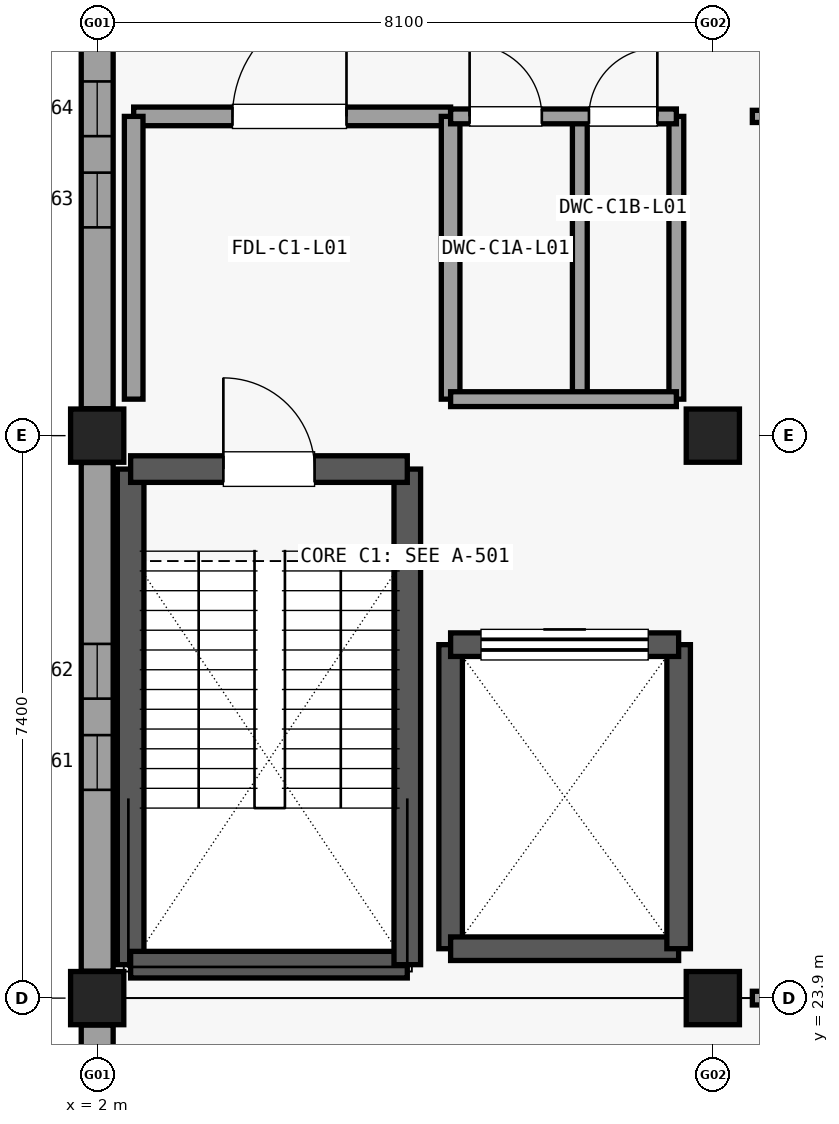
"""IFC4 building model, lengths in metres.
Left out: names, types, materials, properties, quantities, classifications, styles, units other than length and angle.
Written with IfcOpenShell. Run it as: python <this file> out.ifc"""

import sys

from ifc_helpers import new_model, si_unit, direction, frame, frame_2d, origin, origin_2d, place, context, subcontext, project, spatial, rectangle, extrude, element, fill, save


model = new_model("IFC4")
c1 = context("Model", 3, precision=1e-05, world=origin(), true_north=direction((0.0, 1.0)))
c2 = subcontext(c1, "Body", "Model", "MODEL_VIEW")
j1 = project(units=[si_unit("LENGTHUNIT", "METRE"), si_unit("PLANEANGLEUNIT", "RADIAN")], contexts=[c1])
p1 = place(None, origin())
s1 = spatial("IfcSite", under=j1, at=p1, CompositionType="ELEMENT")
p2 = place(p1, origin())
s2 = spatial("IfcBuilding", under=s1, at=p2, CompositionType="ELEMENT")
p3 = place(p2, frame((0.0, 0.0, 5.4)))
s3 = spatial("IfcBuildingStorey", under=s2, at=p3, CompositionType="ELEMENT", Elevation=5.4)
for number, where, z_axis, x_axis in (
    (1, (2.0, 23.9, 0.0), (0.0, 0.0, 1.0), (1.0, 0.0, 0.0)),
    (2, (2.0, 31.3, 0.0), (0.0, 0.0, 1.0), (1.0, 0.0, 0.0)),
    (3, (10.1, 23.9, 0.0), (0.0, 0.0, 1.0), (1.0, 0.0, 0.0)),
    (4, (10.1, 31.3, 0.0), (0.0, 0.0, 1.0), (1.0, 0.0, 0.0)),
):
    element("IfcColumn", number, at=place(p3, frame(where, z_axis=z_axis, x_axis=x_axis)), inside=s3, PredefinedType="COLUMN", context=c2, shape_type="SweptSolid", body=[
        extrude(rectangle(XDim=0.7, YDim=0.7, at=origin_2d()), origin(), (0.0, 0.0, 1.0), 4.56),
    ])
p4 = place(p3, frame((2.0, 16.854, 0.0), z_axis=(0.0, 0.0, 1.0), x_axis=(0.0, 1.0, 0.0)))
e5 = element("IfcWall", 5, at=p4, inside=s3, PredefinedType="SOLIDWALL", context=c2, shape_type="SweptSolid", body=[
    extrude(rectangle(XDim=6.692, YDim=0.42, at=frame_2d((3.346, 0.0))), origin(), (0.0, 0.0, 1.0), 3.795),
])
p5 = place(p4, frame((2.386, 0.0, 0.65)))
e6 = element("IfcOpeningElement", 6, at=p5, cuts=e5, PredefinedType="OPENING", context=c2, shape_type="SweptSolid", body=[
    extrude(rectangle(XDim=0.72, YDim=2.65, at=frame_2d((0.36, 1.325))), frame((0.0, 0.22, 0.0), z_axis=(0.0, -1.0, 0.0), x_axis=(1.0, 0.0, 0.0)), (0.0, 0.0, 1.0), 0.44),
])
p6 = place(p4, frame((3.586, 0.0, 0.65)))
e7 = element("IfcOpeningElement", 7, at=p6, cuts=e5, PredefinedType="OPENING", context=c2, shape_type="SweptSolid", body=[
    extrude(rectangle(XDim=0.72, YDim=2.65, at=frame_2d((0.36, 1.325))), frame((0.0, 0.22, 0.0), z_axis=(0.0, -1.0, 0.0), x_axis=(1.0, 0.0, 0.0)), (0.0, 0.0, 1.0), 0.44),
])
p7 = place(p3, frame((2.0, 24.254, 0.0), z_axis=(0.0, 0.0, 1.0), x_axis=(0.0, 1.0, 0.0)))
e8 = element("IfcWall", 8, at=p7, inside=s3, PredefinedType="SOLIDWALL", context=c2, shape_type="SweptSolid", body=[
    extrude(rectangle(XDim=6.692, YDim=0.42, at=frame_2d((3.346, 0.0))), origin(), (0.0, 0.0, 1.0), 3.795),
])
p8 = place(p7, frame((2.386, 0.0, 0.65)))
e9 = element("IfcOpeningElement", 9, at=p8, cuts=e8, PredefinedType="OPENING", context=c2, shape_type="SweptSolid", body=[
    extrude(rectangle(XDim=0.72, YDim=2.65, at=frame_2d((0.36, 1.325))), frame((0.0, 0.22, 0.0), z_axis=(0.0, -1.0, 0.0), x_axis=(1.0, 0.0, 0.0)), (0.0, 0.0, 1.0), 0.44),
])
p9 = place(p7, frame((3.586, 0.0, 0.65)))
e10 = element("IfcOpeningElement", 10, at=p9, cuts=e8, PredefinedType="OPENING", context=c2, shape_type="SweptSolid", body=[
    extrude(rectangle(XDim=0.72, YDim=2.65, at=frame_2d((0.36, 1.325))), frame((0.0, 0.22, 0.0), z_axis=(0.0, -1.0, 0.0), x_axis=(1.0, 0.0, 0.0)), (0.0, 0.0, 1.0), 0.44),
])
p10 = place(p3, frame((2.0, 31.654, 0.0), z_axis=(0.0, 0.0, 1.0), x_axis=(0.0, 1.0, 0.0)))
e11 = element("IfcWall", 11, at=p10, inside=s3, PredefinedType="SOLIDWALL", context=c2, shape_type="SweptSolid", body=[
    extrude(rectangle(XDim=6.692, YDim=0.42, at=frame_2d((3.346, 0.0))), origin(), (0.0, 0.0, 1.0), 3.795),
])
p11 = place(p10, frame((2.386, 0.0, 0.65)))
e12 = element("IfcOpeningElement", 12, at=p11, cuts=e11, PredefinedType="OPENING", context=c2, shape_type="SweptSolid", body=[
    extrude(rectangle(XDim=0.72, YDim=2.65, at=frame_2d((0.36, 1.325))), frame((0.0, 0.22, 0.0), z_axis=(0.0, -1.0, 0.0), x_axis=(1.0, 0.0, 0.0)), (0.0, 0.0, 1.0), 0.44),
])
p12 = place(p10, frame((3.586, 0.0, 0.65)))
e13 = element("IfcOpeningElement", 13, at=p12, cuts=e11, PredefinedType="OPENING", context=c2, shape_type="SweptSolid", body=[
    extrude(rectangle(XDim=0.72, YDim=2.65, at=frame_2d((0.36, 1.325))), frame((0.0, 0.22, 0.0), z_axis=(0.0, -1.0, 0.0), x_axis=(1.0, 0.0, 0.0)), (0.0, 0.0, 1.0), 0.44),
])
p13 = place(p3, frame((2.44, 24.34, 0.0), z_axis=(0.0, 0.0, 1.0), x_axis=(0.0, 1.0, 0.0)))
e14 = element("IfcWall", 14, at=p13, inside=s3, PredefinedType="SHEAR", context=c2, shape_type="SweptSolid", body=[
    extrude(rectangle(XDim=6.52, YDim=0.35, at=frame_2d((3.26, 0.0))), origin(), (0.0, 0.0, 1.0), 4.555),
])
p14 = place(p3, frame((2.44, 24.34, 0.0), z_axis=(0.0, 0.0, 1.0), x_axis=(1.0, 0.0, 0.0)))
e15 = element("IfcWall", 15, at=p14, inside=s3, PredefinedType="SHEAR", context=c2, shape_type="SweptSolid", body=[
    extrude(rectangle(XDim=3.64, YDim=0.35, at=frame_2d((1.82, 0.0))), origin(), (0.0, 0.0, 1.0), 4.555),
])
p15 = place(p3, frame((6.08, 24.34, 0.0), z_axis=(0.0, 0.0, 1.0), x_axis=(0.0, 1.0, 0.0)))
e16 = element("IfcWall", 16, at=p15, inside=s3, PredefinedType="SHEAR", context=c2, shape_type="SweptSolid", body=[
    extrude(rectangle(XDim=6.52, YDim=0.35, at=frame_2d((3.26, 0.0))), origin(), (0.0, 0.0, 1.0), 4.555),
])
p16 = place(p3, frame((2.44, 30.86, 0.0), z_axis=(0.0, 0.0, 1.0), x_axis=(1.0, 0.0, 0.0)))
e17 = element("IfcWall", 17, at=p16, inside=s3, PredefinedType="SHEAR", context=c2, shape_type="SweptSolid", body=[
    extrude(rectangle(XDim=3.64, YDim=0.35, at=frame_2d((1.82, 0.0))), origin(), (0.0, 0.0, 1.0), 4.555),
])
p17 = place(p16, frame((1.22, 0.0, 0.0)))
e18 = element("IfcOpeningElement", 18, at=p17, cuts=e17, PredefinedType="OPENING", context=c2, shape_type="SweptSolid", body=[
    extrude(rectangle(XDim=1.2, YDim=2.15, at=frame_2d((0.6, 1.075))), frame((0.0, 0.185, 0.0), z_axis=(0.0, -1.0, 0.0), x_axis=(1.0, 0.0, 0.0)), (0.0, 0.0, 1.0), 0.37),
])
p18 = place(p3, frame((6.65, 24.55, 0.0), z_axis=(0.0, 0.0, 1.0), x_axis=(0.0, 1.0, 0.0)))
e19 = element("IfcWall", 19, at=p18, inside=s3, PredefinedType="SHEAR", context=c2, shape_type="SweptSolid", body=[
    extrude(rectangle(XDim=4.0, YDim=0.31, at=frame_2d((2.0, 0.0))), origin(), (0.0, 0.0, 1.0), 4.555),
])
p19 = place(p3, frame((6.65, 24.55, 0.0), z_axis=(0.0, 0.0, 1.0), x_axis=(1.0, 0.0, 0.0)))
e20 = element("IfcWall", 20, at=p19, inside=s3, PredefinedType="SHEAR", context=c2, shape_type="SweptSolid", body=[
    extrude(rectangle(XDim=3.0, YDim=0.31, at=frame_2d((1.5, 0.0))), origin(), (0.0, 0.0, 1.0), 4.555),
])
p20 = place(p3, frame((9.65, 24.55, 0.0), z_axis=(0.0, 0.0, 1.0), x_axis=(0.0, 1.0, 0.0)))
e21 = element("IfcWall", 21, at=p20, inside=s3, PredefinedType="SHEAR", context=c2, shape_type="SweptSolid", body=[
    extrude(rectangle(XDim=4.0, YDim=0.31, at=frame_2d((2.0, 0.0))), origin(), (0.0, 0.0, 1.0), 4.555),
])
p21 = place(p3, frame((6.65, 28.55, 0.0), z_axis=(0.0, 0.0, 1.0), x_axis=(1.0, 0.0, 0.0)))
e22 = element("IfcWall", 22, at=p21, inside=s3, PredefinedType="SHEAR", context=c2, shape_type="SweptSolid", body=[
    extrude(rectangle(XDim=3.0, YDim=0.31, at=frame_2d((1.5, 0.0))), origin(), (0.0, 0.0, 1.0), 4.555),
])
p22 = place(p21, frame((0.4, 0.0, 0.0)))
e23 = element("IfcOpeningElement", 23, at=p22, cuts=e22, PredefinedType="OPENING", context=c2, shape_type="SweptSolid", body=[
    extrude(rectangle(XDim=2.2, YDim=2.55, at=frame_2d((1.1, 1.275))), frame((0.0, 0.165, 0.0), z_axis=(0.0, -1.0, 0.0), x_axis=(1.0, 0.0, 0.0)), (0.0, 0.0, 1.0), 0.33),
])
p23 = place(p3, frame((2.48, 35.5, 0.0), z_axis=(0.0, 0.0, 1.0), x_axis=(1.0, 0.0, 0.0)))
e24 = element("IfcWall", 24, at=p23, inside=s3, PredefinedType="PARTITIONING", context=c2, shape_type="SweptSolid", body=[
    extrude(rectangle(XDim=4.17, YDim=0.245, at=frame_2d((2.085, 0.0))), origin(), (0.0, 0.0, 1.0), 3.8),
])
p24 = place(p23, frame((1.3, 0.0, 0.0)))
e25 = element("IfcOpeningElement", 25, at=p24, cuts=e24, PredefinedType="OPENING", context=c2, shape_type="SweptSolid", body=[
    extrude(rectangle(XDim=1.5, YDim=2.15, at=frame_2d((0.75, 1.075))), frame((0.0, 0.133, 0.0), z_axis=(0.0, -1.0, 0.0), x_axis=(1.0, 0.0, 0.0)), (0.0, 0.0, 1.0), 0.265),
])
for number, where, z_axis, x_axis in (
    (26, (2.48, 31.78, 0.0), (0.0, 0.0, 1.0), (0.0, 1.0, 0.0)),
    (27, (6.65, 31.78, 0.0), (0.0, 0.0, 1.0), (0.0, 1.0, 0.0)),
):
    element("IfcWall", number, at=place(p3, frame(where, z_axis=z_axis, x_axis=x_axis)), inside=s3, PredefinedType="PARTITIONING", context=c2, shape_type="SweptSolid", body=[
        extrude(rectangle(XDim=3.72, YDim=0.245, at=frame_2d((1.86, 0.0))), origin(), (0.0, 0.0, 1.0), 3.8),
    ])
for number, where, z_axis, x_axis in (
    (28, (8.35, 31.78, 0.0), (0.0, 0.0, 1.0), (0.0, 1.0, 0.0)),
    (29, (9.62, 31.78, 0.0), (0.0, 0.0, 1.0), (0.0, 1.0, 0.0)),
):
    element("IfcWall", number, at=place(p3, frame(where, z_axis=z_axis, x_axis=x_axis)), inside=s3, PredefinedType="PARTITIONING", context=c2, shape_type="SweptSolid", body=[
        extrude(rectangle(XDim=3.72, YDim=0.195, at=frame_2d((1.86, 0.0))), origin(), (0.0, 0.0, 1.0), 3.8),
    ])
p25 = place(p3, frame((6.65, 31.78, 0.0), z_axis=(0.0, 0.0, 1.0), x_axis=(1.0, 0.0, 0.0)))
e30 = element("IfcWall", 30, at=p25, inside=s3, PredefinedType="PARTITIONING", context=c2, shape_type="SweptSolid", body=[
    extrude(rectangle(XDim=2.97, YDim=0.195, at=frame_2d((1.485, 0.0))), origin(), (0.0, 0.0, 1.0), 3.8),
])
p26 = place(p3, frame((6.65, 35.5, 0.0), z_axis=(0.0, 0.0, 1.0), x_axis=(1.0, 0.0, 0.0)))
e31 = element("IfcWall", 31, at=p26, inside=s3, PredefinedType="PARTITIONING", context=c2, shape_type="SweptSolid", body=[
    extrude(rectangle(XDim=2.97, YDim=0.195, at=frame_2d((1.485, 0.0))), origin(), (0.0, 0.0, 1.0), 3.8),
])
p27 = place(p26, frame((0.25, 0.0, 0.0)))
e32 = element("IfcOpeningElement", 32, at=p27, cuts=e31, PredefinedType="OPENING", context=c2, shape_type="SweptSolid", body=[
    extrude(rectangle(XDim=0.95, YDim=2.1, at=frame_2d((0.475, 1.05))), frame((0.0, 0.107, 0.0), z_axis=(0.0, -1.0, 0.0), x_axis=(1.0, 0.0, 0.0)), (0.0, 0.0, 1.0), 0.215),
])
p28 = place(p26, frame((1.82, 0.0, 0.0)))
e33 = element("IfcOpeningElement", 33, at=p28, cuts=e31, PredefinedType="OPENING", context=c2, shape_type="SweptSolid", body=[
    extrude(rectangle(XDim=0.9, YDim=2.1, at=frame_2d((0.45, 1.05))), frame((0.0, 0.107, 0.0), z_axis=(0.0, -1.0, 0.0), x_axis=(1.0, 0.0, 0.0)), (0.0, 0.0, 1.0), 0.215),
])
p29 = place(p3, frame((10.62, 23.9, 0.0), z_axis=(0.0, 0.0, 1.0), x_axis=(1.0, 0.0, 0.0)))
e34 = element("IfcWall", 34, at=p29, inside=s3, PredefinedType="PARTITIONING", context=c2, shape_type="SweptSolid", body=[
    extrude(rectangle(XDim=7.06, YDim=0.18, at=frame_2d((3.53, 0.0))), origin(), (0.0, 0.0, 1.0), 3.8),
])
p30 = place(p29, frame((2.88, 0.0, 0.0)))
e35 = element("IfcOpeningElement", 35, at=p30, cuts=e34, PredefinedType="OPENING", context=c2, shape_type="SweptSolid", body=[
    extrude(rectangle(XDim=1.3, YDim=2.2, at=frame_2d((0.65, 1.1))), frame((0.0, 0.1, 0.0), z_axis=(0.0, -1.0, 0.0), x_axis=(1.0, 0.0, 0.0)), (0.0, 0.0, 1.0), 0.2),
])
p31 = place(p3, frame((10.62, 35.5, 0.0), z_axis=(0.0, 0.0, 1.0), x_axis=(1.0, 0.0, 0.0)))
e36 = element("IfcWall", 36, at=p31, inside=s3, PredefinedType="PARTITIONING", context=c2, shape_type="SweptSolid", body=[
    extrude(rectangle(XDim=7.06, YDim=0.16, at=frame_2d((3.53, 0.0))), origin(), (0.0, 0.0, 1.0), 3.8),
])
p32 = place(p31, frame((2.855, 0.0, 0.0)))
e37 = element("IfcOpeningElement", 37, at=p32, cuts=e36, PredefinedType="OPENING", context=c2, shape_type="SweptSolid", body=[
    extrude(rectangle(XDim=1.35, YDim=2.2, at=frame_2d((0.675, 1.1))), frame((0.0, 0.09, 0.0), z_axis=(0.0, -1.0, 0.0), x_axis=(1.0, 0.0, 0.0)), (0.0, 0.0, 1.0), 0.18),
])
p33 = place(p8, origin())
e38 = element("IfcWindow", 38, at=p33, inside=s3, PartitioningType="SINGLE_PANEL", PredefinedType="WINDOW", context=c2, shape_type="SweptSolid", body=[
    extrude(rectangle(XDim=0.72, YDim=2.65, at=frame_2d((0.36, 1.325))), frame((0.0, 0.03, 0.0), z_axis=(0.0, -1.0, 0.0), x_axis=(1.0, 0.0, 0.0)), (0.0, 0.0, 1.0), 0.06),
])
fill(e9, e38)
p34 = place(p9, origin())
e39 = element("IfcWindow", 39, at=p34, inside=s3, PartitioningType="SINGLE_PANEL", PredefinedType="WINDOW", context=c2, shape_type="SweptSolid", body=[
    extrude(rectangle(XDim=0.72, YDim=2.65, at=frame_2d((0.36, 1.325))), frame((0.0, 0.03, 0.0), z_axis=(0.0, -1.0, 0.0), x_axis=(1.0, 0.0, 0.0)), (0.0, 0.0, 1.0), 0.06),
])
fill(e10, e39)
p35 = place(p11, origin())
e40 = element("IfcWindow", 40, at=p35, inside=s3, PartitioningType="SINGLE_PANEL", PredefinedType="WINDOW", context=c2, shape_type="SweptSolid", body=[
    extrude(rectangle(XDim=0.72, YDim=2.65, at=frame_2d((0.36, 1.325))), frame((0.0, 0.03, 0.0), z_axis=(0.0, -1.0, 0.0), x_axis=(1.0, 0.0, 0.0)), (0.0, 0.0, 1.0), 0.06),
])
fill(e12, e40)
p36 = place(p12, origin())
e41 = element("IfcWindow", 41, at=p36, inside=s3, PartitioningType="SINGLE_PANEL", PredefinedType="WINDOW", context=c2, shape_type="SweptSolid", body=[
    extrude(rectangle(XDim=0.72, YDim=2.65, at=frame_2d((0.36, 1.325))), frame((0.0, 0.03, 0.0), z_axis=(0.0, -1.0, 0.0), x_axis=(1.0, 0.0, 0.0)), (0.0, 0.0, 1.0), 0.06),
])
fill(e13, e41)
p37 = place(p17, origin())
e42 = element("IfcDoor", 42, at=p37, inside=s3, OperationType="SINGLE_SWING_LEFT", PredefinedType="DOOR", context=c2, shape_type="SweptSolid", body=[
    extrude(rectangle(XDim=1.2, YDim=2.15, at=frame_2d((0.6, 1.075))), frame((0.0, 0.025, 0.0), z_axis=(0.0, -1.0, 0.0), x_axis=(1.0, 0.0, 0.0)), (0.0, 0.0, 1.0), 0.05),
])
fill(e18, e42)
p38 = place(p22, origin())
e43 = element("IfcDoor", 43, at=p38, inside=s3, OperationType="SLIDING_TO_LEFT", PredefinedType="DOOR", context=c2, shape_type="SweptSolid", body=[
    extrude(rectangle(XDim=2.2, YDim=2.55, at=frame_2d((1.1, 1.275))), frame((0.0, 0.025, 0.0), z_axis=(0.0, -1.0, 0.0), x_axis=(1.0, 0.0, 0.0)), (0.0, 0.0, 1.0), 0.05),
])
fill(e23, e43)
p39 = place(p24, origin())
e44 = element("IfcDoor", 44, at=p39, inside=s3, OperationType="SINGLE_SWING_RIGHT", PredefinedType="DOOR", context=c2, shape_type="SweptSolid", body=[
    extrude(rectangle(XDim=1.5, YDim=2.15, at=frame_2d((0.75, 1.075))), frame((0.0, 0.025, 0.0), z_axis=(0.0, -1.0, 0.0), x_axis=(1.0, 0.0, 0.0)), (0.0, 0.0, 1.0), 0.05),
])
fill(e25, e44)
p40 = place(p27, origin())
e45 = element("IfcDoor", 45, at=p40, inside=s3, OperationType="SINGLE_SWING_LEFT", PredefinedType="DOOR", context=c2, shape_type="SweptSolid", body=[
    extrude(rectangle(XDim=0.95, YDim=2.1, at=frame_2d((0.475, 1.05))), frame((0.0, 0.025, 0.0), z_axis=(0.0, -1.0, 0.0), x_axis=(1.0, 0.0, 0.0)), (0.0, 0.0, 1.0), 0.05),
])
fill(e32, e45)
p41 = place(p28, origin())
e46 = element("IfcDoor", 46, at=p41, inside=s3, OperationType="SINGLE_SWING_RIGHT", PredefinedType="DOOR", context=c2, shape_type="SweptSolid", body=[
    extrude(rectangle(XDim=0.9, YDim=2.1, at=frame_2d((0.45, 1.05))), frame((0.0, 0.025, 0.0), z_axis=(0.0, -1.0, 0.0), x_axis=(1.0, 0.0, 0.0)), (0.0, 0.0, 1.0), 0.05),
])
fill(e33, e46)
save(model, sys.argv[1])
